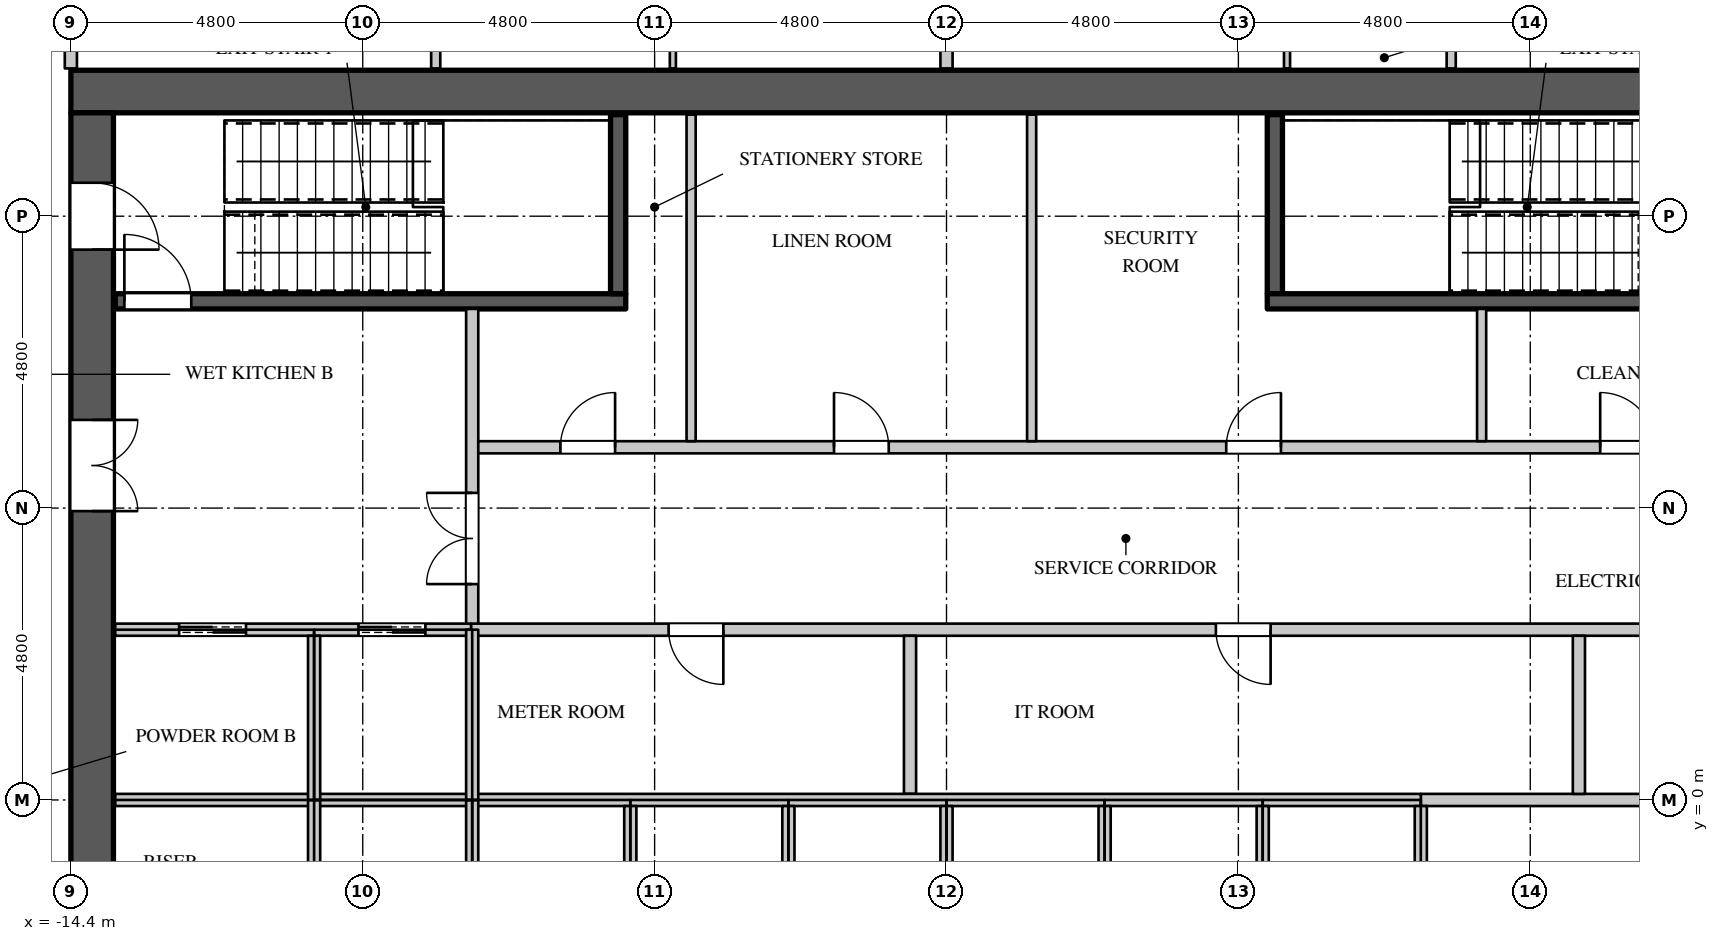
"""IFC4 building model, lengths in metres.
Left out: names, types, materials, properties, quantities, classifications, styles, units other than length and angle.
Written with IfcOpenShell. Run it as: python <this file> out.ifc"""

import sys

from ifc_helpers import new_model, si_unit, direction, frame, frame_2d, origin, place, context, subcontext, project, spatial, rectangle, extrude, element, fill, save


model = new_model("IFC4")
c1 = context("Model", 3, precision=1e-05, world=origin(), true_north=direction((0.0, 1.0)))
c2 = subcontext(c1, "Body", "Model", "MODEL_VIEW")
j1 = project(units=[si_unit("LENGTHUNIT", "METRE"), si_unit("PLANEANGLEUNIT", "RADIAN")], contexts=[c1])
p1 = place(None, origin())
s1 = spatial("IfcSite", under=j1, at=p1, CompositionType="ELEMENT")
p2 = place(p1, origin())
s2 = spatial("IfcBuilding", under=s1, at=p2, CompositionType="ELEMENT")
p3 = place(p2, frame((0.0, 0.0, 200.1)))
s3 = spatial("IfcBuildingStorey", under=s2, at=p3, CompositionType="ELEMENT", Elevation=200.1)
p4 = place(p3, frame((-14.4, 11.65, 0.0), z_axis=(0.0, 0.0, 1.0), x_axis=(1.0, 0.0, 0.0)))
e1 = element("IfcWall", 1, at=p4, inside=s3, PredefinedType="SHEAR", context=c2, shape_type="SweptSolid", body=[
    extrude(rectangle(XDim=28.8, YDim=0.7, at=frame_2d((14.4, 0.0))), origin(), (0.0, 0.0, 1.0), 4.2),
])
p5 = place(p3, frame((-14.05, -11.3, 0.0), z_axis=(0.0, 0.0, 1.0), x_axis=(0.0, 1.0, 0.0)))
e2 = element("IfcWall", 2, at=p5, inside=s3, PredefinedType="SHEAR", context=c2, shape_type="SweptSolid", body=[
    extrude(rectangle(XDim=22.6, YDim=0.7, at=frame_2d((11.3, 0.0))), origin(), (0.0, 0.0, 1.0), 4.2),
])
p6 = place(p5, frame((20.35, 0.0, 0.0)))
e3 = element("IfcOpeningElement", 3, at=p6, cuts=e2, PredefinedType="OPENING", context=c2, shape_type="SweptSolid", body=[
    extrude(rectangle(XDim=1.1, YDim=2.2, at=frame_2d((0.55, 1.1))), frame((0.0, 0.36, 0.0), z_axis=(0.0, -1.0, 0.0), x_axis=(1.0, 0.0, 0.0)), (0.0, 0.0, 1.0), 0.72),
])
p7 = place(p5, frame((1.15, 0.0, 0.0)))
e4 = element("IfcOpeningElement", 4, at=p7, cuts=e2, PredefinedType="OPENING", context=c2, shape_type="SweptSolid", body=[
    extrude(rectangle(XDim=1.1, YDim=2.2, at=frame_2d((0.55, 1.1))), frame((0.0, 0.36, 0.0), z_axis=(0.0, -1.0, 0.0), x_axis=(1.0, 0.0, 0.0)), (0.0, 0.0, 1.0), 0.72),
])
p8 = place(p5, frame((16.05, 0.0, 0.0)))
e5 = element("IfcOpeningElement", 5, at=p8, cuts=e2, PredefinedType="OPENING", context=c2, shape_type="SweptSolid", body=[
    extrude(rectangle(XDim=1.5, YDim=2.4, at=frame_2d((0.75, 1.2))), frame((0.0, 0.36, 0.0), z_axis=(0.0, -1.0, 0.0), x_axis=(1.0, 0.0, 0.0)), (0.0, 0.0, 1.0), 0.72),
])
p9 = place(p5, frame((5.05, 0.0, 0.0)))
e6 = element("IfcOpeningElement", 6, at=p9, cuts=e2, PredefinedType="OPENING", context=c2, shape_type="SweptSolid", body=[
    extrude(rectangle(XDim=1.5, YDim=2.4, at=frame_2d((0.75, 1.2))), frame((0.0, 0.36, 0.0), z_axis=(0.0, -1.0, 0.0), x_axis=(1.0, 0.0, 0.0)), (0.0, 0.0, 1.0), 0.72),
])
p10 = place(p3, frame((-14.4, 12.03, 0.0), z_axis=(0.0, 0.0, 1.0), x_axis=(0.0, 1.0, 0.0)))
e7 = element("IfcWall", 7, at=p10, inside=s3, PredefinedType="PARTITIONING", context=c2, shape_type="SweptSolid", body=[
    extrude(rectangle(XDim=2.27, YDim=0.2, at=frame_2d((1.135, 0.0))), origin(), (0.0, 0.0, 1.0), 3.798),
])
p11 = place(p3, frame((-7.8, 2.8, 0.0), z_axis=(0.0, 0.0, 1.0), x_axis=(0.0, 1.0, 0.0)))
e8 = element("IfcWall", 8, at=p11, inside=s3, PredefinedType="PARTITIONING", context=c2, shape_type="SweptSolid", body=[
    extrude(rectangle(XDim=5.275, YDim=0.2, at=frame_2d((2.637, 0.0))), origin(), (0.0, 0.0, 1.0), 3.798),
])
p12 = place(p11, frame((0.75, 0.0, 0.0)))
e9 = element("IfcOpeningElement", 9, at=p12, cuts=e8, PredefinedType="OPENING", context=c2, shape_type="SweptSolid", body=[
    extrude(rectangle(XDim=1.5, YDim=2.4, at=frame_2d((0.75, 1.2))), frame((0.0, 0.11, 0.0), z_axis=(0.0, -1.0, 0.0), x_axis=(1.0, 0.0, 0.0)), (0.0, 0.0, 1.0), 0.22),
])
p13 = place(p3, frame((-7.7, 5.8, 0.0), z_axis=(0.0, 0.0, 1.0), x_axis=(1.0, 0.0, 0.0)))
e10 = element("IfcWall", 10, at=p13, inside=s3, PredefinedType="PARTITIONING", context=c2, shape_type="SweptSolid", body=[
    extrude(rectangle(XDim=21.37, YDim=0.2, at=frame_2d((10.685, 0.0))), origin(), (0.0, 0.0, 1.0), 3.798),
])
p14 = place(p13, frame((1.35, 0.0, 0.0)))
e11 = element("IfcOpeningElement", 11, at=p14, cuts=e10, PredefinedType="OPENING", context=c2, shape_type="SweptSolid", body=[
    extrude(rectangle(XDim=0.9, YDim=2.2, at=frame_2d((0.45, 1.1))), frame((0.0, 0.11, 0.0), z_axis=(0.0, -1.0, 0.0), x_axis=(1.0, 0.0, 0.0)), (0.0, 0.0, 1.0), 0.22),
])
p15 = place(p13, frame((5.85, 0.0, 0.0)))
e12 = element("IfcOpeningElement", 12, at=p15, cuts=e10, PredefinedType="OPENING", context=c2, shape_type="SweptSolid", body=[
    extrude(rectangle(XDim=0.9, YDim=2.2, at=frame_2d((0.45, 1.1))), frame((0.0, 0.11, 0.0), z_axis=(0.0, -1.0, 0.0), x_axis=(1.0, 0.0, 0.0)), (0.0, 0.0, 1.0), 0.22),
])
p16 = place(p13, frame((12.3, 0.0, 0.0)))
e13 = element("IfcOpeningElement", 13, at=p16, cuts=e10, PredefinedType="OPENING", context=c2, shape_type="SweptSolid", body=[
    extrude(rectangle(XDim=0.9, YDim=2.2, at=frame_2d((0.45, 1.1))), frame((0.0, 0.11, 0.0), z_axis=(0.0, -1.0, 0.0), x_axis=(1.0, 0.0, 0.0)), (0.0, 0.0, 1.0), 0.22),
])
p17 = place(p13, frame((18.45, 0.0, 0.0)))
e14 = element("IfcOpeningElement", 14, at=p17, cuts=e10, PredefinedType="OPENING", context=c2, shape_type="SweptSolid", body=[
    extrude(rectangle(XDim=0.9, YDim=2.2, at=frame_2d((0.45, 1.1))), frame((0.0, 0.11, 0.0), z_axis=(0.0, -1.0, 0.0), x_axis=(1.0, 0.0, 0.0)), (0.0, 0.0, 1.0), 0.22),
])
p18 = place(p3, frame((-8.4, 12.03, 0.0), z_axis=(0.0, 0.0, 1.0), x_axis=(0.0, 1.0, 0.0)))
e15 = element("IfcWall", 15, at=p18, inside=s3, PredefinedType="PARTITIONING", context=c2, shape_type="SweptSolid", body=[
    extrude(rectangle(XDim=4.245, YDim=0.15, at=frame_2d((2.123, 0.0))), origin(), (0.0, 0.0, 1.0), 3.798),
])
for number, where, z_axis, x_axis in (
    (16, (-4.2, 5.9, 0.0), (0.0, 0.0, 1.0), (0.0, 1.0, 0.0)),
    (17, (1.4, 5.9, 0.0), (0.0, 0.0, 1.0), (0.0, 1.0, 0.0)),
):
    element("IfcWall", number, at=place(p3, frame(where, z_axis=z_axis, x_axis=x_axis)), inside=s3, PredefinedType="PARTITIONING", context=c2, shape_type="SweptSolid", body=[
        extrude(rectangle(XDim=5.37, YDim=0.15, at=frame_2d((2.685, 0.0))), origin(), (0.0, 0.0, 1.0), 3.798),
    ])
p19 = place(p3, frame((8.3, 12.03, 0.0), z_axis=(0.0, 0.0, 1.0), x_axis=(0.0, 1.0, 0.0)))
e18 = element("IfcWall", 18, at=p19, inside=s3, PredefinedType="PARTITIONING", context=c2, shape_type="SweptSolid", body=[
    extrude(rectangle(XDim=3.445, YDim=0.15, at=frame_2d((1.723, 0.0))), origin(), (0.0, 0.0, 1.0), 3.798),
])
p20 = place(p19, frame((1.2, 0.0, 0.0)))
e19 = element("IfcOpeningElement", 19, at=p20, cuts=e18, PredefinedType="OPENING", context=c2, shape_type="SweptSolid", body=[
    extrude(rectangle(XDim=0.95, YDim=2.2, at=frame_2d((0.475, 1.1))), frame((0.0, 0.085, 0.0), z_axis=(0.0, -1.0, 0.0), x_axis=(1.0, 0.0, 0.0)), (0.0, 0.0, 1.0), 0.17),
])
p21 = place(p3, frame((8.8, 5.9, 0.0), z_axis=(0.0, 0.0, 1.0), x_axis=(0.0, 1.0, 0.0)))
e20 = element("IfcWall", 20, at=p21, inside=s3, PredefinedType="PARTITIONING", context=c2, shape_type="SweptSolid", body=[
    extrude(rectangle(XDim=2.175, YDim=0.15, at=frame_2d((1.087, 0.0))), origin(), (0.0, 0.0, 1.0), 3.798),
])
p22 = place(p3, frame((0.0, 12.03, 0.0), z_axis=(0.0, 0.0, 1.0), x_axis=(0.0, 1.0, 0.0)))
e21 = element("IfcWall", 21, at=p22, inside=s3, PredefinedType="PARTITIONING", context=c2, shape_type="SweptSolid", body=[
    extrude(rectangle(XDim=11.995, YDim=0.2, at=frame_2d((5.998, 0.0))), origin(), (0.0, 0.0, 1.0), 3.798),
])
p23 = place(p3, frame((-7.82, 2.8, 0.0), z_axis=(0.0, 0.0, 1.0), x_axis=(1.0, 0.0, 0.0)))
e22 = element("IfcWall", 22, at=p23, inside=s3, PredefinedType="PARTITIONING", context=c2, shape_type="SweptSolid", body=[
    extrude(rectangle(XDim=21.49, YDim=0.2, at=frame_2d((10.745, 0.0))), origin(), (0.0, 0.0, 1.0), 3.798),
])
p24 = place(p23, frame((19.5, 0.0, 0.0)))
e23 = element("IfcOpeningElement", 23, at=p24, cuts=e22, PredefinedType="OPENING", context=c2, shape_type="SweptSolid", body=[
    extrude(rectangle(XDim=0.6, YDim=2.0, at=frame_2d((0.3, 1.0))), frame((0.0, 0.11, 0.0), z_axis=(0.0, -1.0, 0.0), x_axis=(1.0, 0.0, 0.0)), (0.0, 0.0, 1.0), 0.22),
])
p25 = place(p23, frame((3.25, 0.0, 0.0)))
e24 = element("IfcOpeningElement", 24, at=p25, cuts=e22, PredefinedType="OPENING", context=c2, shape_type="SweptSolid", body=[
    extrude(rectangle(XDim=0.9, YDim=2.2, at=frame_2d((0.45, 1.1))), frame((0.0, 0.11, 0.0), z_axis=(0.0, -1.0, 0.0), x_axis=(1.0, 0.0, 0.0)), (0.0, 0.0, 1.0), 0.22),
])
p26 = place(p23, frame((12.25, 0.0, 0.0)))
e25 = element("IfcOpeningElement", 25, at=p26, cuts=e22, PredefinedType="OPENING", context=c2, shape_type="SweptSolid", body=[
    extrude(rectangle(XDim=0.9, YDim=2.2, at=frame_2d((0.45, 1.1))), frame((0.0, 0.11, 0.0), z_axis=(0.0, -1.0, 0.0), x_axis=(1.0, 0.0, 0.0)), (0.0, 0.0, 1.0), 0.22),
])
p27 = place(p3, frame((-0.6, 0.1, 0.0), z_axis=(0.0, 0.0, 1.0), x_axis=(0.0, 1.0, 0.0)))
e26 = element("IfcWall", 26, at=p27, inside=s3, PredefinedType="PARTITIONING", context=c2, shape_type="SweptSolid", body=[
    extrude(rectangle(XDim=2.6, YDim=0.2, at=frame_2d((1.3, 0.0))), origin(), (0.0, 0.0, 1.0), 3.798),
])
p28 = place(p3, frame((7.8, 0.0, 0.0), z_axis=(0.0, 0.0, 1.0), x_axis=(1.0, 0.0, 0.0)))
e27 = element("IfcWall", 27, at=p28, inside=s3, PredefinedType="PARTITIONING", context=c2, shape_type="SweptSolid", body=[
    extrude(rectangle(XDim=5.87, YDim=0.2, at=frame_2d((2.935, 0.0))), origin(), (0.0, 0.0, 1.0), 3.798),
])
p29 = place(p3, frame((10.4, 0.1, 0.0), z_axis=(0.0, 0.0, 1.0), x_axis=(0.0, 1.0, 0.0)))
e28 = element("IfcWall", 28, at=p29, inside=s3, PredefinedType="PARTITIONING", context=c2, shape_type="SweptSolid", body=[
    extrude(rectangle(XDim=2.6, YDim=0.2, at=frame_2d((1.3, 0.0))), origin(), (0.0, 0.0, 1.0), 3.798),
])
p30 = place(p3, frame((-13.67, 0.0, 0.0), z_axis=(0.0, 0.0, 1.0), x_axis=(1.0, 0.0, 0.0)))
e29 = element("IfcWall", 29, at=p30, inside=s3, PredefinedType="PARTITIONING", context=c2, shape_type="SweptSolid", body=[
    extrude(rectangle(XDim=21.47, YDim=0.2, at=frame_2d((10.735, 0.0))), origin(), (0.0, 0.0, 1.0), 3.798),
])
p31 = place(p3, frame((-13.67, 2.8, 0.0), z_axis=(0.0, 0.0, 1.0), x_axis=(1.0, 0.0, 0.0)))
e30 = element("IfcWall", 30, at=p31, inside=s3, PredefinedType="PARTITIONING", context=c2, shape_type="SweptSolid", body=[
    extrude(rectangle(XDim=5.85, YDim=0.2, at=frame_2d((2.925, 0.0))), origin(), (0.0, 0.0, 1.0), 3.798),
])
p32 = place(p31, frame((1.05, 0.0, 0.0)))
e31 = element("IfcOpeningElement", 31, at=p32, cuts=e30, PredefinedType="OPENING", context=c2, shape_type="SweptSolid", body=[
    extrude(rectangle(XDim=1.1, YDim=2.2, at=frame_2d((0.55, 1.1))), frame((0.0, 0.11, 0.0), z_axis=(0.0, -1.0, 0.0), x_axis=(1.0, 0.0, 0.0)), (0.0, 0.0, 1.0), 0.22),
])
p33 = place(p31, frame((4.0, 0.0, 0.0)))
e32 = element("IfcOpeningElement", 32, at=p33, cuts=e30, PredefinedType="OPENING", context=c2, shape_type="SweptSolid", body=[
    extrude(rectangle(XDim=1.1, YDim=2.2, at=frame_2d((0.55, 1.1))), frame((0.0, 0.11, 0.0), z_axis=(0.0, -1.0, 0.0), x_axis=(1.0, 0.0, 0.0)), (0.0, 0.0, 1.0), 0.22),
])
for number, where, z_axis, x_axis in (
    (33, (-10.4, -2.7, 0.0), (0.0, 0.0, 1.0), (0.0, 1.0, 0.0)),
    (34, (-10.4, 0.0, 0.0), (0.0, 0.0, 1.0), (0.0, 1.0, 0.0)),
):
    element("IfcWall", number, at=place(p3, frame(where, z_axis=z_axis, x_axis=x_axis)), inside=s3, PredefinedType="PARTITIONING", context=c2, shape_type="SweptSolid", body=[
        extrude(rectangle(XDim=2.7, YDim=0.2, at=frame_2d((1.35, 0.0))), origin(), (0.0, 0.0, 1.0), 3.798),
    ])
for number, where, z_axis, x_axis in (
    (35, (-7.8, -2.8, 0.0), (0.0, 0.0, 1.0), (0.0, 1.0, 0.0)),
    (36, (-7.8, 0.0, 0.0), (0.0, 0.0, 1.0), (0.0, 1.0, 0.0)),
):
    element("IfcWall", number, at=place(p3, frame(where, z_axis=z_axis, x_axis=x_axis)), inside=s3, PredefinedType="PARTITIONING", context=c2, shape_type="SweptSolid", body=[
        extrude(rectangle(XDim=2.8, YDim=0.2, at=frame_2d((1.4, 0.0))), origin(), (0.0, 0.0, 1.0), 3.798),
    ])
for number, where, z_axis, x_axis in (
    (37, (-5.2, -2.7, 0.0), (0.0, 0.0, 1.0), (0.0, 1.0, 0.0)),
    (38, (-2.6, -2.7, 0.0), (0.0, 0.0, 1.0), (0.0, 1.0, 0.0)),
    (39, (0.0, -2.7, 0.0), (0.0, 0.0, 1.0), (0.0, 1.0, 0.0)),
    (40, (2.6, -2.7, 0.0), (0.0, 0.0, 1.0), (0.0, 1.0, 0.0)),
    (41, (5.2, -2.7, 0.0), (0.0, 0.0, 1.0), (0.0, 1.0, 0.0)),
    (42, (7.8, -2.7, 0.0), (0.0, 0.0, 1.0), (0.0, 1.0, 0.0)),
):
    element("IfcWall", number, at=place(p3, frame(where, z_axis=z_axis, x_axis=x_axis)), inside=s3, PredefinedType="PARTITIONING", context=c2, shape_type="SweptSolid", body=[
        extrude(rectangle(XDim=2.6, YDim=0.2, at=frame_2d((1.3, 0.0))), origin(), (0.0, 0.0, 1.0), 3.798),
    ])
p34 = place(p3, frame((-13.67, 8.2, 0.0), z_axis=(0.0, 0.0, 1.0), x_axis=(1.0, 0.0, 0.0)))
e43 = element("IfcWall", 43, at=p34, inside=s3, PredefinedType="SHEAR", context=c2, shape_type="SweptSolid", body=[
    extrude(rectangle(XDim=8.395, YDim=0.25, at=frame_2d((4.198, 0.0))), origin(), (0.0, 0.0, 1.0), 3.798),
])
p35 = place(p34, frame((0.15, 0.0, 0.0)))
e44 = element("IfcOpeningElement", 44, at=p35, cuts=e43, PredefinedType="OPENING", context=c2, shape_type="SweptSolid", body=[
    extrude(rectangle(XDim=1.1, YDim=2.2, at=frame_2d((0.55, 1.1))), frame((0.0, 0.135, 0.0), z_axis=(0.0, -1.0, 0.0), x_axis=(1.0, 0.0, 0.0)), (0.0, 0.0, 1.0), 0.27),
])
for number, where, z_axis, x_axis in (
    (45, (-5.4, 8.325, 0.0), (0.0, 0.0, 1.0), (0.0, 1.0, 0.0)),
    (46, (5.4, 8.325, 0.0), (0.0, 0.0, 1.0), (0.0, 1.0, 0.0)),
):
    element("IfcWall", number, at=place(p3, frame(where, z_axis=z_axis, x_axis=x_axis)), inside=s3, PredefinedType="SHEAR", context=c2, shape_type="SweptSolid", body=[
        extrude(rectangle(XDim=2.945, YDim=0.25, at=frame_2d((1.473, 0.0))), origin(), (0.0, 0.0, 1.0), 3.798),
    ])
p36 = place(p3, frame((5.275, 8.2, 0.0), z_axis=(0.0, 0.0, 1.0), x_axis=(1.0, 0.0, 0.0)))
e47 = element("IfcWall", 47, at=p36, inside=s3, PredefinedType="SHEAR", context=c2, shape_type="SweptSolid", body=[
    extrude(rectangle(XDim=8.395, YDim=0.25, at=frame_2d((4.198, 0.0))), origin(), (0.0, 0.0, 1.0), 3.798),
])
p37 = place(p3, frame((-4.5, 12.03, 0.0), z_axis=(0.0, 0.0, 1.0), x_axis=(0.0, 1.0, 0.0)))
e48 = element("IfcWall", 48, at=p37, inside=s3, PredefinedType="PARTITIONING", context=c2, shape_type="SweptSolid", body=[
    extrude(rectangle(XDim=4.695, YDim=0.1, at=frame_2d((2.348, 0.0))), origin(), (0.0, 0.0, 1.0), 3.798),
])
p38 = place(p3, frame((5.6, 12.03, 0.0), z_axis=(0.0, 0.0, 1.0), x_axis=(0.0, 1.0, 0.0)))
e49 = element("IfcWall", 49, at=p38, inside=s3, PredefinedType="PARTITIONING", context=c2, shape_type="SweptSolid", body=[
    extrude(rectangle(XDim=4.395, YDim=0.1, at=frame_2d((2.198, 0.0))), origin(), (0.0, 0.0, 1.0), 3.798),
])
p39 = place(p14, origin())
e50 = element("IfcDoor", 50, at=p39, inside=s3, OperationType="SINGLE_SWING_RIGHT", PredefinedType="DOOR", context=c2, shape_type="SweptSolid", body=[
    extrude(rectangle(XDim=0.9, YDim=2.2, at=frame_2d((0.45, 1.1))), frame((0.0, 0.025, 0.0), z_axis=(0.0, -1.0, 0.0), x_axis=(1.0, 0.0, 0.0)), (0.0, 0.0, 1.0), 0.05),
])
fill(e11, e50)
p40 = place(p15, origin())
e51 = element("IfcDoor", 51, at=p40, inside=s3, OperationType="SINGLE_SWING_LEFT", PredefinedType="DOOR", context=c2, shape_type="SweptSolid", body=[
    extrude(rectangle(XDim=0.9, YDim=2.2, at=frame_2d((0.45, 1.1))), frame((0.0, 0.025, 0.0), z_axis=(0.0, -1.0, 0.0), x_axis=(1.0, 0.0, 0.0)), (0.0, 0.0, 1.0), 0.05),
])
fill(e12, e51)
p41 = place(p16, origin())
e52 = element("IfcDoor", 52, at=p41, inside=s3, OperationType="SINGLE_SWING_RIGHT", PredefinedType="DOOR", context=c2, shape_type="SweptSolid", body=[
    extrude(rectangle(XDim=0.9, YDim=2.2, at=frame_2d((0.45, 1.1))), frame((0.0, 0.025, 0.0), z_axis=(0.0, -1.0, 0.0), x_axis=(1.0, 0.0, 0.0)), (0.0, 0.0, 1.0), 0.05),
])
fill(e13, e52)
p42 = place(p17, origin())
e53 = element("IfcDoor", 53, at=p42, inside=s3, OperationType="SINGLE_SWING_LEFT", PredefinedType="DOOR", context=c2, shape_type="SweptSolid", body=[
    extrude(rectangle(XDim=0.9, YDim=2.2, at=frame_2d((0.45, 1.1))), frame((0.0, 0.025, 0.0), z_axis=(0.0, -1.0, 0.0), x_axis=(1.0, 0.0, 0.0)), (0.0, 0.0, 1.0), 0.05),
])
fill(e14, e53)
p43 = place(p25, origin())
e54 = element("IfcDoor", 54, at=p43, inside=s3, OperationType="SINGLE_SWING_LEFT", PredefinedType="DOOR", context=c2, shape_type="SweptSolid", body=[
    extrude(rectangle(XDim=0.9, YDim=2.2, at=frame_2d((0.45, 1.1))), frame((0.0, 0.025, 0.0), z_axis=(0.0, -1.0, 0.0), x_axis=(1.0, 0.0, 0.0)), (0.0, 0.0, 1.0), 0.05),
])
fill(e24, e54)
p44 = place(p26, origin())
e55 = element("IfcDoor", 55, at=p44, inside=s3, OperationType="SINGLE_SWING_LEFT", PredefinedType="DOOR", context=c2, shape_type="SweptSolid", body=[
    extrude(rectangle(XDim=0.9, YDim=2.2, at=frame_2d((0.45, 1.1))), frame((0.0, 0.025, 0.0), z_axis=(0.0, -1.0, 0.0), x_axis=(1.0, 0.0, 0.0)), (0.0, 0.0, 1.0), 0.05),
])
fill(e25, e55)
p45 = place(p32, origin())
e56 = element("IfcDoor", 56, at=p45, inside=s3, OperationType="DOUBLE_DOOR_SLIDING", PredefinedType="DOOR", context=c2, shape_type="SweptSolid", body=[
    extrude(rectangle(XDim=1.1, YDim=2.2, at=frame_2d((0.55, 1.1))), frame((0.0, 0.025, 0.0), z_axis=(0.0, -1.0, 0.0), x_axis=(1.0, 0.0, 0.0)), (0.0, 0.0, 1.0), 0.05),
])
fill(e31, e56)
p46 = place(p33, origin())
e57 = element("IfcDoor", 57, at=p46, inside=s3, OperationType="DOUBLE_DOOR_SLIDING", PredefinedType="DOOR", context=c2, shape_type="SweptSolid", body=[
    extrude(rectangle(XDim=1.1, YDim=2.2, at=frame_2d((0.55, 1.1))), frame((0.0, 0.025, 0.0), z_axis=(0.0, -1.0, 0.0), x_axis=(1.0, 0.0, 0.0)), (0.0, 0.0, 1.0), 0.05),
])
fill(e32, e57)
p47 = place(p35, origin())
e58 = element("IfcDoor", 58, at=p47, inside=s3, OperationType="SINGLE_SWING_LEFT", PredefinedType="DOOR", context=c2, shape_type="SweptSolid", body=[
    extrude(rectangle(XDim=1.1, YDim=2.2, at=frame_2d((0.55, 1.1))), frame((0.0, 0.025, 0.0), z_axis=(0.0, -1.0, 0.0), x_axis=(1.0, 0.0, 0.0)), (0.0, 0.0, 1.0), 0.05),
])
fill(e44, e58)
p48 = place(p12, origin())
e59 = element("IfcDoor", 59, at=p48, inside=s3, OperationType="DOUBLE_DOOR_SINGLE_SWING", PredefinedType="DOOR", context=c2, shape_type="SweptSolid", body=[
    extrude(rectangle(XDim=1.5, YDim=2.4, at=frame_2d((0.75, 1.2))), frame((0.0, 0.025, 0.0), z_axis=(0.0, -1.0, 0.0), x_axis=(1.0, 0.0, 0.0)), (0.0, 0.0, 1.0), 0.05),
])
fill(e9, e59)
p49 = place(p6, origin())
e60 = element("IfcDoor", 60, at=p49, inside=s3, OperationType="SINGLE_SWING_RIGHT", PredefinedType="DOOR", context=c2, shape_type="SweptSolid", body=[
    extrude(rectangle(XDim=1.1, YDim=2.2, at=frame_2d((0.55, 1.1))), frame((0.0, -0.295, 0.0), z_axis=(0.0, -1.0, 0.0), x_axis=(1.0, 0.0, 0.0)), (0.0, 0.0, 1.0), 0.05),
])
fill(e3, e60)
p50 = place(p8, origin())
e61 = element("IfcDoor", 61, at=p50, inside=s3, OperationType="DOUBLE_DOOR_SINGLE_SWING", PredefinedType="DOOR", context=c2, shape_type="SweptSolid", body=[
    extrude(rectangle(XDim=1.5, YDim=2.4, at=frame_2d((0.75, 1.2))), frame((0.0, -0.295, 0.0), z_axis=(0.0, -1.0, 0.0), x_axis=(1.0, 0.0, 0.0)), (0.0, 0.0, 1.0), 0.05),
])
fill(e5, e61)
save(model, sys.argv[1])
